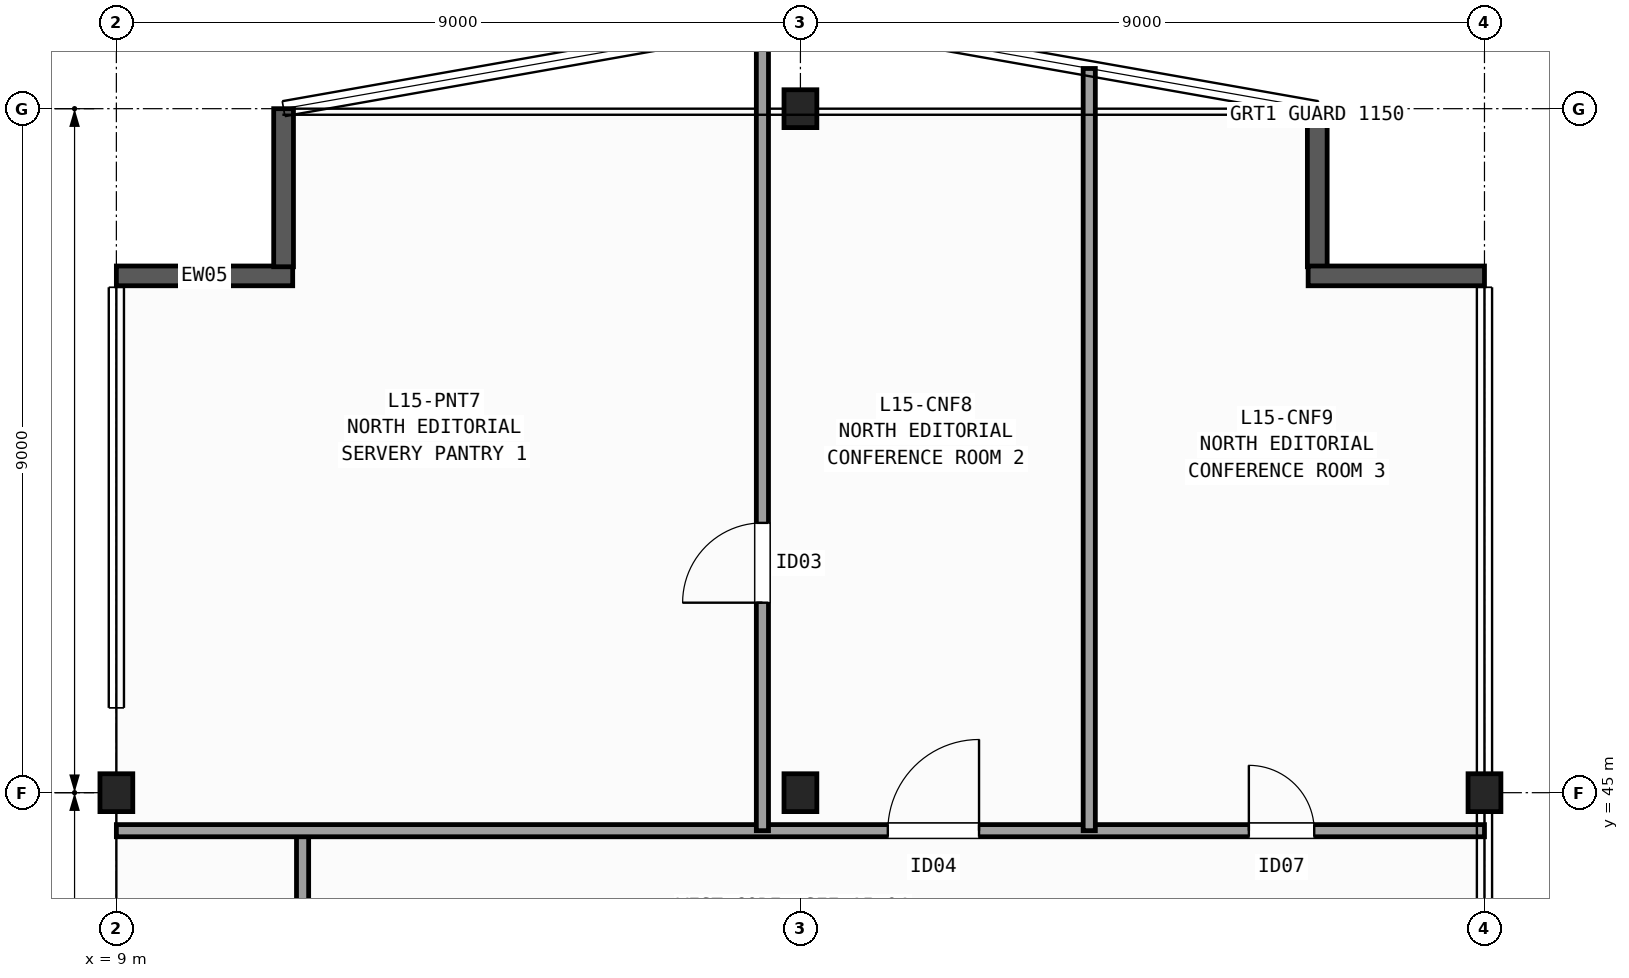
"""IFC4 building model, lengths in metres.
Left out: names, types, materials, properties, quantities, classifications, styles, units other than length and angle.
Written with IfcOpenShell. Run it as: python <this file> out.ifc"""

import sys

from ifc_helpers import new_model, si_unit, direction, frame, frame_2d, origin, origin_2d, place, context, subcontext, project, spatial, rectangle, i_section, extrude, element, fill, save


model = new_model("IFC4")
c1 = context("Model", 3, precision=1e-05, world=origin(), true_north=direction((0.0, 1.0)))
c2 = subcontext(c1, "Body", "Model", "MODEL_VIEW")
j1 = project(units=[si_unit("LENGTHUNIT", "METRE"), si_unit("PLANEANGLEUNIT", "RADIAN")], contexts=[c1])
p1 = place(None, origin())
s1 = spatial("IfcSite", under=j1, at=p1, CompositionType="ELEMENT")
p2 = place(p1, origin())
s2 = spatial("IfcBuilding", under=s1, at=p2, CompositionType="ELEMENT")
p3 = place(p2, frame((0.0, 0.0, 65.6)))
s3 = spatial("IfcBuildingStorey", under=s2, at=p3, CompositionType="ELEMENT", Elevation=65.6)
for number, where, z_axis, x_axis in (
    (1, (9.0, 45.0, 0.0), (0.0, 0.0, 1.0), (1.0, 0.0, 0.0)),
    (2, (18.0, 45.0, 0.0), (0.0, 0.0, 1.0), (1.0, 0.0, 0.0)),
    (3, (18.0, 54.0, 0.0), (0.0, 0.0, 1.0), (1.0, 0.0, 0.0)),
    (4, (27.0, 45.0, 0.0), (0.0, 0.0, 1.0), (1.0, 0.0, 0.0)),
):
    element("IfcColumn", number, at=place(p3, frame(where, z_axis=z_axis, x_axis=x_axis)), inside=s3, PredefinedType="COLUMN", context=c2, shape_type="SweptSolid", body=[
        extrude(i_section(OverallWidth=0.432, OverallDepth=0.498, WebThickness=0.056, FlangeThickness=0.089, FilletRadius=0.015, at=origin_2d()), origin(), (0.0, 0.0, 1.0), 3.7),
    ])
p4 = place(p3, frame((9.0, 51.8, 0.0), z_axis=(0.0, 0.0, 1.0), x_axis=(1.0, 0.0, 0.0)))
e5 = element("IfcWall", 5, at=p4, inside=s3, PredefinedType="SOLIDWALL", context=c2, shape_type="SweptSolid", body=[
    extrude(rectangle(XDim=2.32, YDim=0.26, at=frame_2d((1.16, 0.0))), origin(), (0.0, 0.0, 1.0), 3.42),
])
for number, where, z_axis, x_axis in (
    (6, (11.2, 51.92, 0.0), (0.0, 0.0, 1.0), (0.0, 1.0, 0.0)),
    (7, (24.8, 54.0, 0.0), (0.0, 0.0, 1.0), (0.0, -1.0, 0.0)),
):
    element("IfcWall", number, at=place(p3, frame(where, z_axis=z_axis, x_axis=x_axis)), inside=s3, PredefinedType="SOLIDWALL", context=c2, shape_type="SweptSolid", body=[
        extrude(rectangle(XDim=2.08, YDim=0.26, at=frame_2d((1.04, 0.0))), origin(), (0.0, 0.0, 1.0), 3.42),
    ])
p5 = place(p3, frame((24.68, 51.8, 0.0), z_axis=(0.0, 0.0, 1.0), x_axis=(1.0, 0.0, 0.0)))
e8 = element("IfcWall", 8, at=p5, inside=s3, PredefinedType="SOLIDWALL", context=c2, shape_type="SweptSolid", body=[
    extrude(rectangle(XDim=2.32, YDim=0.26, at=frame_2d((1.16, 0.0))), origin(), (0.0, 0.0, 1.0), 3.42),
])
p6 = place(p3, frame((11.45, 42.4, 0.0), z_axis=(0.0, 0.0, 1.0), x_axis=(0.0, 1.0, 0.0)))
e9 = element("IfcWall", 9, at=p6, inside=s3, PredefinedType="PARTITIONING", context=c2, shape_type="SweptSolid", body=[
    extrude(rectangle(XDim=2.1, YDim=0.16, at=frame_2d((1.05, 0.0))), origin(), (0.0, 0.0, 1.0), 3.42),
])
p7 = place(p3, frame((9.0, 44.5, 0.0), z_axis=(0.0, 0.0, 1.0), x_axis=(1.0, 0.0, 0.0)))
e10 = element("IfcWall", 10, at=p7, inside=s3, PredefinedType="PARTITIONING", context=c2, shape_type="SweptSolid", body=[
    extrude(rectangle(XDim=18.0, YDim=0.16, at=frame_2d((9.0, 0.0))), origin(), (0.0, 0.0, 1.0), 2.627),
])
p8 = place(p7, frame((10.15, 0.0, 0.0)))
e11 = element("IfcOpeningElement", 11, at=p8, cuts=e10, PredefinedType="OPENING", context=c2, shape_type="SweptSolid", body=[
    extrude(rectangle(XDim=1.2, YDim=2.15, at=frame_2d((0.6, 1.075))), frame((0.0, 0.09, 0.0), z_axis=(0.0, -1.0, 0.0), x_axis=(1.0, 0.0, 0.0)), (0.0, 0.0, 1.0), 0.18),
])
p9 = place(p7, frame((14.9, 0.0, 0.0)))
e12 = element("IfcOpeningElement", 12, at=p9, cuts=e10, PredefinedType="OPENING", context=c2, shape_type="SweptSolid", body=[
    extrude(rectangle(XDim=0.86, YDim=2.05, at=frame_2d((0.43, 1.025))), frame((0.0, 0.09, 0.0), z_axis=(0.0, -1.0, 0.0), x_axis=(1.0, 0.0, 0.0)), (0.0, 0.0, 1.0), 0.18),
])
p10 = place(p3, frame((17.5, 44.5, 0.0), z_axis=(0.0, 0.0, 1.0), x_axis=(0.0, 1.0, 0.0)))
e13 = element("IfcWall", 13, at=p10, inside=s3, PredefinedType="PARTITIONING", context=c2, shape_type="SweptSolid", body=[
    extrude(rectangle(XDim=10.612, YDim=0.16, at=frame_2d((5.306, 0.0))), origin(), (0.0, 0.0, 1.0), 3.42),
])
p11 = place(p10, frame((3.0, 0.0, 0.0)))
e14 = element("IfcOpeningElement", 14, at=p11, cuts=e13, PredefinedType="OPENING", context=c2, shape_type="SweptSolid", body=[
    extrude(rectangle(XDim=1.05, YDim=2.15, at=frame_2d((0.525, 1.075))), frame((0.0, 0.09, 0.0), z_axis=(0.0, -1.0, 0.0), x_axis=(1.0, 0.0, 0.0)), (0.0, 0.0, 1.0), 0.18),
])
p12 = place(p3, frame((21.8, 44.5, 0.0), z_axis=(0.0, 0.0, 1.0), x_axis=(0.0, 1.0, 0.0)))
e15 = element("IfcWall", 15, at=p12, inside=s3, PredefinedType="PARTITIONING", context=c2, shape_type="SweptSolid", body=[
    extrude(rectangle(XDim=10.029, YDim=0.16, at=frame_2d((5.015, 0.0))), origin(), (0.0, 0.0, 1.0), 3.42),
])
p13 = place(p11, origin())
e16 = element("IfcDoor", 16, at=p13, inside=s3, OperationType="SINGLE_SWING_LEFT", PredefinedType="DOOR", context=c2, shape_type="SweptSolid", body=[
    extrude(rectangle(XDim=1.05, YDim=2.15, at=frame_2d((0.525, 1.075))), frame((0.0, 0.025, 0.0), z_axis=(0.0, -1.0, 0.0), x_axis=(1.0, 0.0, 0.0)), (0.0, 0.0, 1.0), 0.05),
])
fill(e14, e16)
p14 = place(p8, origin())
e17 = element("IfcDoor", 17, at=p14, inside=s3, OperationType="SINGLE_SWING_RIGHT", PredefinedType="DOOR", context=c2, shape_type="SweptSolid", body=[
    extrude(rectangle(XDim=1.2, YDim=2.15, at=frame_2d((0.6, 1.075))), frame((0.0, 0.025, 0.0), z_axis=(0.0, -1.0, 0.0), x_axis=(1.0, 0.0, 0.0)), (0.0, 0.0, 1.0), 0.05),
])
fill(e11, e17)
p15 = place(p9, origin())
e18 = element("IfcDoor", 18, at=p15, inside=s3, OperationType="SINGLE_SWING_LEFT", PredefinedType="DOOR", context=c2, shape_type="SweptSolid", body=[
    extrude(rectangle(XDim=0.86, YDim=2.05, at=frame_2d((0.43, 1.025))), frame((0.0, 0.025, 0.0), z_axis=(0.0, -1.0, 0.0), x_axis=(1.0, 0.0, 0.0)), (0.0, 0.0, 1.0), 0.05),
])
fill(e12, e18)
save(model, sys.argv[1])
